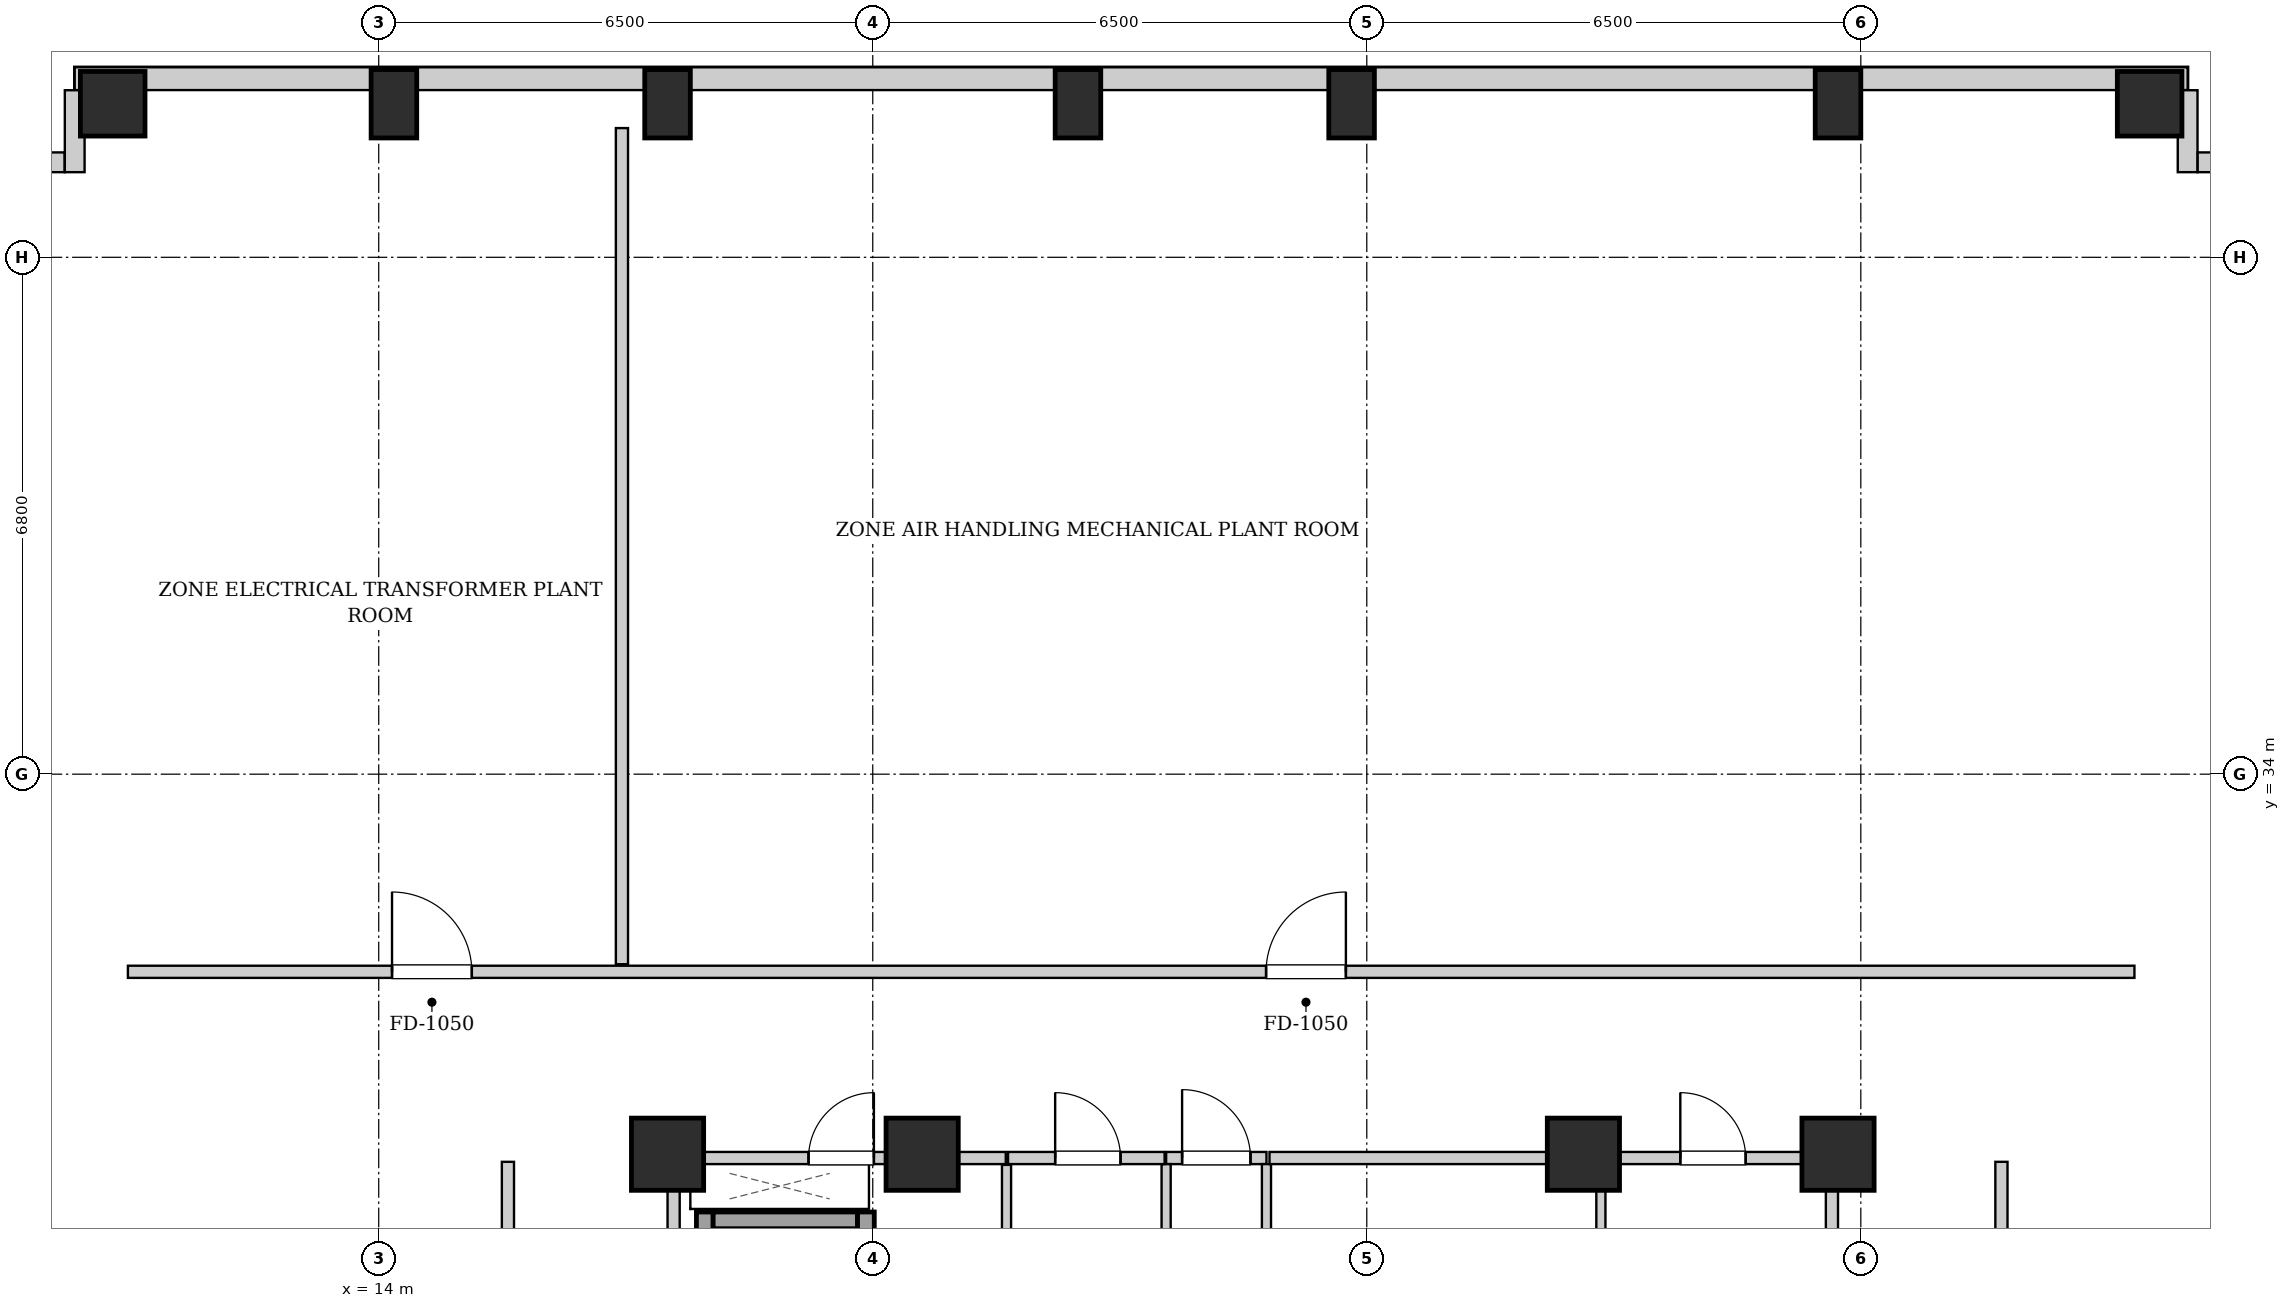
"""IFC4 building model, lengths in metres.
Left out: names, types, materials, properties, quantities, classifications, styles, units other than length and angle.
Written with IfcOpenShell. Run it as: python <this file> out.ifc"""

import sys

from ifc_helpers import new_model, si_unit, direction, frame, frame_2d, origin, origin_2d, place, context, subcontext, project, spatial, rectangle, extrude, element, fill, save


model = new_model("IFC4")
c1 = context("Model", 3, precision=1e-05, world=origin(), true_north=direction((0.0, 1.0)))
c2 = subcontext(c1, "Body", "Model", "MODEL_VIEW")
j1 = project(units=[si_unit("LENGTHUNIT", "METRE"), si_unit("PLANEANGLEUNIT", "RADIAN")], contexts=[c1])
p1 = place(None, origin())
s1 = spatial("IfcSite", under=j1, at=p1, CompositionType="ELEMENT")
p2 = place(p1, origin())
s2 = spatial("IfcBuilding", under=s1, at=p2, CompositionType="ELEMENT")
p3 = place(p2, frame((0.0, 0.0, 169.9)))
s3 = spatial("IfcBuildingStorey", under=s2, at=p3, CompositionType="ELEMENT", Elevation=169.9)
p4 = place(p3, frame((10.5, 42.82, 0.0), z_axis=(0.0, 0.0, 1.0), x_axis=(1.0, 0.0, 0.0)))
e1 = element("IfcColumn", 1, at=p4, inside=s3, PredefinedType="COLUMN", context=c2, shape_type="SweptSolid", body=[
    extrude(rectangle(XDim=0.85, YDim=0.85, at=origin_2d()), origin(), (0.0, 0.0, 1.0), 4.5),
])
for number, where, z_axis, x_axis in (
    (2, (14.2, 42.82, 0.0), (0.0, 0.0, 1.0), (1.0, 0.0, 0.0)),
    (3, (17.8, 42.82, 0.0), (0.0, 0.0, 1.0), (1.0, 0.0, 0.0)),
    (4, (23.2, 42.82, 0.0), (0.0, 0.0, 1.0), (1.0, 0.0, 0.0)),
    (5, (26.8, 42.82, 0.0), (0.0, 0.0, 1.0), (1.0, 0.0, 0.0)),
    (6, (33.2, 42.82, 0.0), (0.0, 0.0, 1.0), (1.0, 0.0, 0.0)),
):
    element("IfcColumn", number, at=place(p3, frame(where, z_axis=z_axis, x_axis=x_axis)), inside=s3, PredefinedType="COLUMN", context=c2, shape_type="SweptSolid", body=[
        extrude(rectangle(XDim=0.6, YDim=0.9, at=origin_2d()), origin(), (0.0, 0.0, 1.0), 4.5),
    ])
p5 = place(p3, frame((37.3, 42.82, 0.0), z_axis=(0.0, 0.0, 1.0), x_axis=(1.0, 0.0, 0.0)))
e7 = element("IfcColumn", 7, at=p5, inside=s3, PredefinedType="COLUMN", context=c2, shape_type="SweptSolid", body=[
    extrude(rectangle(XDim=0.85, YDim=0.85, at=origin_2d()), origin(), (0.0, 0.0, 1.0), 4.5),
])
for number, where, z_axis, x_axis in (
    (8, (17.8, 29.0, 0.0), (0.0, 0.0, 1.0), (1.0, 0.0, 0.0)),
    (9, (21.15, 29.0, 0.0), (0.0, 0.0, 1.0), (1.0, 0.0, 0.0)),
    (10, (29.85, 29.0, 0.0), (0.0, 0.0, 1.0), (1.0, 0.0, 0.0)),
    (11, (33.2, 29.0, 0.0), (0.0, 0.0, 1.0), (1.0, 0.0, 0.0)),
):
    element("IfcColumn", number, at=place(p3, frame(where, z_axis=z_axis, x_axis=x_axis)), inside=s3, PredefinedType="COLUMN", context=c2, shape_type="SweptSolid", body=[
        extrude(rectangle(XDim=0.95, YDim=0.95, at=origin_2d()), origin(), (0.0, 0.0, 1.0), 4.5),
    ])
p6 = place(p3, frame((10.0, 43.15, 0.0), z_axis=(0.0, 0.0, 1.0), x_axis=(1.0, 0.0, 0.0)))
e12 = element("IfcWall", 12, at=p6, inside=s3, PredefinedType="SOLIDWALL", context=c2, shape_type="SweptSolid", body=[
    extrude(rectangle(XDim=27.8, YDim=0.3, at=frame_2d((13.9, 0.0))), origin(), (0.0, 0.0, 1.0), 1.965),
])
p7 = place(p3, frame((8.882, 42.05, 0.0), z_axis=(0.0, 0.0, 1.0), x_axis=(1.0, 0.0, 0.0)))
e13 = element("IfcWall", 13, at=p7, inside=s3, PredefinedType="SOLIDWALL", context=c2, shape_type="SweptSolid", body=[
    extrude(rectangle(XDim=0.986, YDim=0.26, at=frame_2d((0.493, 0.0))), origin(), (0.0, 0.0, 1.0), 4.18),
])
for number, where, z_axis, x_axis in (
    (14, (10.0, 41.92, 0.0), (0.0, 0.0, 1.0), (0.0, 1.0, 0.0)),
    (15, (37.8, 42.998, 0.0), (0.0, 0.0, 1.0), (0.0, -1.0, 0.0)),
):
    element("IfcWall", number, at=place(p3, frame(where, z_axis=z_axis, x_axis=x_axis)), inside=s3, PredefinedType="SOLIDWALL", context=c2, shape_type="SweptSolid", body=[
        extrude(rectangle(XDim=1.078, YDim=0.26, at=frame_2d((0.539, 0.0))), origin(), (0.0, 0.0, 1.0), 4.18),
    ])
p8 = place(p3, frame((37.932, 42.05, 0.0), z_axis=(0.0, 0.0, 1.0), x_axis=(1.0, 0.0, 0.0)))
e16 = element("IfcWall", 16, at=p8, inside=s3, PredefinedType="SOLIDWALL", context=c2, shape_type="SweptSolid", body=[
    extrude(rectangle(XDim=1.248, YDim=0.26, at=frame_2d((0.624, 0.0))), origin(), (0.0, 0.0, 1.0), 4.18),
])
p9 = place(p3, frame((18.29, 24.1, 0.0), z_axis=(0.0, 0.0, 1.0), x_axis=(0.0, 1.0, 0.0)))
e17 = element("IfcWall", 17, at=p9, inside=s3, PredefinedType="SHEAR", context=c2, shape_type="SweptSolid", body=[
    extrude(rectangle(XDim=4.14, YDim=0.22, at=frame_2d((2.07, 0.0))), origin(), (0.0, 0.0, 1.0), 4.18),
])
p10 = place(p3, frame((18.4, 28.13, 0.0), z_axis=(0.0, 0.0, 1.0), x_axis=(1.0, 0.0, 0.0)))
e18 = element("IfcWall", 18, at=p10, inside=s3, PredefinedType="SHEAR", context=c2, shape_type="SweptSolid", body=[
    extrude(rectangle(XDim=1.9, YDim=0.22, at=frame_2d((0.95, 0.0))), origin(), (0.0, 0.0, 1.0), 4.18),
])
p11 = place(p3, frame((20.41, 26.06, 0.0), z_axis=(0.0, 0.0, 1.0), x_axis=(0.0, 1.0, 0.0)))
e19 = element("IfcWall", 19, at=p11, inside=s3, PredefinedType="SHEAR", context=c2, shape_type="SweptSolid", body=[
    extrude(rectangle(XDim=2.18, YDim=0.22, at=frame_2d((1.09, 0.0))), origin(), (0.0, 0.0, 1.0), 4.18),
])
for number, where, z_axis, x_axis in (
    (20, (17.88, 24.12, 0.0), (0.0, 0.0, 1.0), (0.0, 1.0, 0.0)),
    (21, (33.12, 24.12, 0.0), (0.0, 0.0, 1.0), (0.0, 1.0, 0.0)),
):
    element("IfcWall", number, at=place(p3, frame(where, z_axis=z_axis, x_axis=x_axis)), inside=s3, PredefinedType="PARTITIONING", context=c2, shape_type="SweptSolid", body=[
        extrude(rectangle(XDim=4.76, YDim=0.16, at=frame_2d((2.38, 0.0))), origin(), (0.0, 0.0, 1.0), 4.18),
    ])
p12 = place(p3, frame((24.36, 28.95, 0.0), z_axis=(0.0, 0.0, 1.0), x_axis=(1.0, 0.0, 0.0)))
e22 = element("IfcWall", 22, at=p12, inside=s3, PredefinedType="PARTITIONING", context=c2, shape_type="SweptSolid", body=[
    extrude(rectangle(XDim=1.32, YDim=0.16, at=frame_2d((0.66, 0.0))), origin(), (0.0, 0.0, 1.0), 4.18),
])
p13 = place(p12, frame((0.21, 0.0, 0.0)))
e23 = element("IfcOpeningElement", 23, at=p13, cuts=e22, PredefinedType="OPENING", context=c2, shape_type="SweptSolid", body=[
    extrude(rectangle(XDim=0.9, YDim=2.05, at=frame_2d((0.45, 1.025))), frame((0.0, 0.09, 0.0), z_axis=(0.0, -1.0, 0.0), x_axis=(1.0, 0.0, 0.0)), (0.0, 0.0, 1.0), 0.18),
])
p14 = place(p3, frame((17.96, 28.95, 0.0), z_axis=(0.0, 0.0, 1.0), x_axis=(1.0, 0.0, 0.0)))
e24 = element("IfcWall", 24, at=p14, inside=s3, PredefinedType="PARTITIONING", context=c2, shape_type="SweptSolid", body=[
    extrude(rectangle(XDim=4.29, YDim=0.16, at=frame_2d((2.145, 0.0))), origin(), (0.0, 0.0, 1.0), 4.18),
])
p15 = place(p14, frame((1.695, 0.0, 0.0)))
e25 = element("IfcOpeningElement", 25, at=p15, cuts=e24, PredefinedType="OPENING", context=c2, shape_type="SweptSolid", body=[
    extrude(rectangle(XDim=0.86, YDim=2.05, at=frame_2d((0.43, 1.025))), frame((0.0, 0.09, 0.0), z_axis=(0.0, -1.0, 0.0), x_axis=(1.0, 0.0, 0.0)), (0.0, 0.0, 1.0), 0.18),
])
for number, where, z_axis, x_axis in (
    (26, (24.36, 25.0, 0.0), (0.0, 0.0, 1.0), (0.0, 1.0, 0.0)),
    (27, (25.68, 25.0, 0.0), (0.0, 0.0, 1.0), (0.0, 1.0, 0.0)),
):
    element("IfcWall", number, at=place(p3, frame(where, z_axis=z_axis, x_axis=x_axis)), inside=s3, PredefinedType="PARTITIONING", context=c2, shape_type="SweptSolid", body=[
        extrude(rectangle(XDim=3.87, YDim=0.12, at=frame_2d((1.935, 0.0))), origin(), (0.0, 0.0, 1.0), 4.18),
    ])
p16 = place(p3, frame((30.08, 26.18, 0.0), z_axis=(0.0, 0.0, 1.0), x_axis=(0.0, 1.0, 0.0)))
e28 = element("IfcWall", 28, at=p16, inside=s3, PredefinedType="PARTITIONING", context=c2, shape_type="SweptSolid", body=[
    extrude(rectangle(XDim=2.68, YDim=0.12, at=frame_2d((1.34, 0.0))), origin(), (0.0, 0.0, 1.0), 4.18),
])
p17 = place(p3, frame((22.26, 25.0, 0.0), z_axis=(0.0, 0.0, 1.0), x_axis=(0.0, 1.0, 0.0)))
e29 = element("IfcWall", 29, at=p17, inside=s3, PredefinedType="PARTITIONING", context=c2, shape_type="SweptSolid", body=[
    extrude(rectangle(XDim=3.86, YDim=0.12, at=frame_2d((1.93, 0.0))), origin(), (0.0, 0.0, 1.0), 4.18),
])
p18 = place(p3, frame((22.28, 28.95, 0.0), z_axis=(0.0, 0.0, 1.0), x_axis=(1.0, 0.0, 0.0)))
e30 = element("IfcWall", 30, at=p18, inside=s3, PredefinedType="PARTITIONING", context=c2, shape_type="SweptSolid", body=[
    extrude(rectangle(XDim=2.06, YDim=0.16, at=frame_2d((1.03, 0.0))), origin(), (0.0, 0.0, 1.0), 4.18),
])
p19 = place(p18, frame((0.62, 0.0, 0.0)))
e31 = element("IfcOpeningElement", 31, at=p19, cuts=e30, PredefinedType="OPENING", context=c2, shape_type="SweptSolid", body=[
    extrude(rectangle(XDim=0.86, YDim=2.05, at=frame_2d((0.43, 1.025))), frame((0.0, 0.09, 0.0), z_axis=(0.0, -1.0, 0.0), x_axis=(1.0, 0.0, 0.0)), (0.0, 0.0, 1.0), 0.18),
])
p20 = place(p3, frame((25.72, 28.95, 0.0), z_axis=(0.0, 0.0, 1.0), x_axis=(1.0, 0.0, 0.0)))
e32 = element("IfcWall", 32, at=p20, inside=s3, PredefinedType="PARTITIONING", context=c2, shape_type="SweptSolid", body=[
    extrude(rectangle(XDim=4.32, YDim=0.16, at=frame_2d((2.16, 0.0))), origin(), (0.0, 0.0, 1.0), 4.18),
])
p21 = place(p3, frame((30.08, 28.95, 0.0), z_axis=(0.0, 0.0, 1.0), x_axis=(1.0, 0.0, 0.0)))
e33 = element("IfcWall", 33, at=p21, inside=s3, PredefinedType="PARTITIONING", context=c2, shape_type="SweptSolid", body=[
    extrude(rectangle(XDim=2.96, YDim=0.16, at=frame_2d((1.48, 0.0))), origin(), (0.0, 0.0, 1.0), 4.18),
])
p22 = place(p21, frame((1.045, 0.0, 0.0)))
e34 = element("IfcOpeningElement", 34, at=p22, cuts=e33, PredefinedType="OPENING", context=c2, shape_type="SweptSolid", body=[
    extrude(rectangle(XDim=0.86, YDim=2.05, at=frame_2d((0.43, 1.025))), frame((0.0, 0.09, 0.0), z_axis=(0.0, -1.0, 0.0), x_axis=(1.0, 0.0, 0.0)), (0.0, 0.0, 1.0), 0.18),
])
p23 = place(p3, frame((10.7, 31.4, 0.0), z_axis=(0.0, 0.0, 1.0), x_axis=(1.0, 0.0, 0.0)))
e35 = element("IfcWall", 35, at=p23, inside=s3, PredefinedType="PARTITIONING", context=c2, shape_type="SweptSolid", body=[
    extrude(rectangle(XDim=26.4, YDim=0.16, at=frame_2d((13.2, 0.0))), origin(), (0.0, 0.0, 1.0), 4.18),
])
p24 = place(p23, frame((3.475, 0.0, 0.0)))
e36 = element("IfcOpeningElement", 36, at=p24, cuts=e35, PredefinedType="OPENING", context=c2, shape_type="SweptSolid", body=[
    extrude(rectangle(XDim=1.05, YDim=2.05, at=frame_2d((0.525, 1.025))), frame((0.0, 0.09, 0.0), z_axis=(0.0, -1.0, 0.0), x_axis=(1.0, 0.0, 0.0)), (0.0, 0.0, 1.0), 0.18),
])
p25 = place(p23, frame((14.975, 0.0, 0.0)))
e37 = element("IfcOpeningElement", 37, at=p25, cuts=e35, PredefinedType="OPENING", context=c2, shape_type="SweptSolid", body=[
    extrude(rectangle(XDim=1.05, YDim=2.05, at=frame_2d((0.525, 1.025))), frame((0.0, 0.09, 0.0), z_axis=(0.0, -1.0, 0.0), x_axis=(1.0, 0.0, 0.0)), (0.0, 0.0, 1.0), 0.18),
])
p26 = place(p3, frame((17.2, 31.5, 0.0), z_axis=(0.0, 0.0, 1.0), x_axis=(0.0, 1.0, 0.0)))
e38 = element("IfcWall", 38, at=p26, inside=s3, PredefinedType="PARTITIONING", context=c2, shape_type="SweptSolid", body=[
    extrude(rectangle(XDim=11.0, YDim=0.16, at=frame_2d((5.5, 0.0))), origin(), (0.0, 0.0, 1.0), 1.965),
])
p27 = place(p3, frame((15.7, 15.1, 0.0), z_axis=(0.0, 0.0, 1.0), x_axis=(0.0, 1.0, 0.0)))
e39 = element("IfcWall", 39, at=p27, inside=s3, PredefinedType="PARTITIONING", context=c2, shape_type="SweptSolid", body=[
    extrude(rectangle(XDim=13.8, YDim=0.16, at=frame_2d((6.9, 0.0))), origin(), (0.0, 0.0, 1.0), 4.18),
])
p28 = place(p27, frame((6.475, 0.0, 0.0)))
e40 = element("IfcOpeningElement", 40, at=p28, cuts=e39, PredefinedType="OPENING", context=c2, shape_type="SweptSolid", body=[
    extrude(rectangle(XDim=1.05, YDim=2.05, at=frame_2d((0.525, 1.025))), frame((0.0, 0.09, 0.0), z_axis=(0.0, -1.0, 0.0), x_axis=(1.0, 0.0, 0.0)), (0.0, 0.0, 1.0), 0.18),
])
p29 = place(p3, frame((35.35, 15.1, 0.0), z_axis=(0.0, 0.0, 1.0), x_axis=(0.0, 1.0, 0.0)))
e41 = element("IfcWall", 41, at=p29, inside=s3, PredefinedType="PARTITIONING", context=c2, shape_type="SweptSolid", body=[
    extrude(rectangle(XDim=13.8, YDim=0.16, at=frame_2d((6.9, 0.0))), origin(), (0.0, 0.0, 1.0), 4.18),
])
p30 = place(p29, frame((6.475, 0.0, 0.0)))
e42 = element("IfcOpeningElement", 42, at=p30, cuts=e41, PredefinedType="OPENING", context=c2, shape_type="SweptSolid", body=[
    extrude(rectangle(XDim=1.05, YDim=2.05, at=frame_2d((0.525, 1.025))), frame((0.0, 0.09, 0.0), z_axis=(0.0, -1.0, 0.0), x_axis=(1.0, 0.0, 0.0)), (0.0, 0.0, 1.0), 0.18),
])
p31 = place(p13, origin())
e43 = element("IfcDoor", 43, at=p31, inside=s3, OperationType="SINGLE_SWING_LEFT", PredefinedType="DOOR", context=c2, shape_type="SweptSolid", body=[
    extrude(rectangle(XDim=0.9, YDim=2.05, at=frame_2d((0.45, 1.025))), frame((0.0, 0.025, 0.0), z_axis=(0.0, -1.0, 0.0), x_axis=(1.0, 0.0, 0.0)), (0.0, 0.0, 1.0), 0.05),
])
fill(e23, e43)
p32 = place(p15, origin())
e44 = element("IfcDoor", 44, at=p32, inside=s3, OperationType="SINGLE_SWING_RIGHT", PredefinedType="DOOR", context=c2, shape_type="SweptSolid", body=[
    extrude(rectangle(XDim=0.86, YDim=2.05, at=frame_2d((0.43, 1.025))), frame((0.0, 0.025, 0.0), z_axis=(0.0, -1.0, 0.0), x_axis=(1.0, 0.0, 0.0)), (0.0, 0.0, 1.0), 0.05),
])
fill(e25, e44)
p33 = place(p19, origin())
e45 = element("IfcDoor", 45, at=p33, inside=s3, OperationType="SINGLE_SWING_LEFT", PredefinedType="DOOR", context=c2, shape_type="SweptSolid", body=[
    extrude(rectangle(XDim=0.86, YDim=2.05, at=frame_2d((0.43, 1.025))), frame((0.0, 0.025, 0.0), z_axis=(0.0, -1.0, 0.0), x_axis=(1.0, 0.0, 0.0)), (0.0, 0.0, 1.0), 0.05),
])
fill(e31, e45)
p34 = place(p22, origin())
e46 = element("IfcDoor", 46, at=p34, inside=s3, OperationType="SINGLE_SWING_LEFT", PredefinedType="DOOR", context=c2, shape_type="SweptSolid", body=[
    extrude(rectangle(XDim=0.86, YDim=2.05, at=frame_2d((0.43, 1.025))), frame((0.0, 0.025, 0.0), z_axis=(0.0, -1.0, 0.0), x_axis=(1.0, 0.0, 0.0)), (0.0, 0.0, 1.0), 0.05),
])
fill(e34, e46)
p35 = place(p24, origin())
e47 = element("IfcDoor", 47, at=p35, inside=s3, OperationType="SINGLE_SWING_LEFT", PredefinedType="DOOR", context=c2, shape_type="SweptSolid", body=[
    extrude(rectangle(XDim=1.05, YDim=2.05, at=frame_2d((0.525, 1.025))), frame((0.0, 0.025, 0.0), z_axis=(0.0, -1.0, 0.0), x_axis=(1.0, 0.0, 0.0)), (0.0, 0.0, 1.0), 0.05),
])
fill(e36, e47)
p36 = place(p25, origin())
e48 = element("IfcDoor", 48, at=p36, inside=s3, OperationType="SINGLE_SWING_RIGHT", PredefinedType="DOOR", context=c2, shape_type="SweptSolid", body=[
    extrude(rectangle(XDim=1.05, YDim=2.05, at=frame_2d((0.525, 1.025))), frame((0.0, 0.025, 0.0), z_axis=(0.0, -1.0, 0.0), x_axis=(1.0, 0.0, 0.0)), (0.0, 0.0, 1.0), 0.05),
])
fill(e37, e48)
save(model, sys.argv[1])
